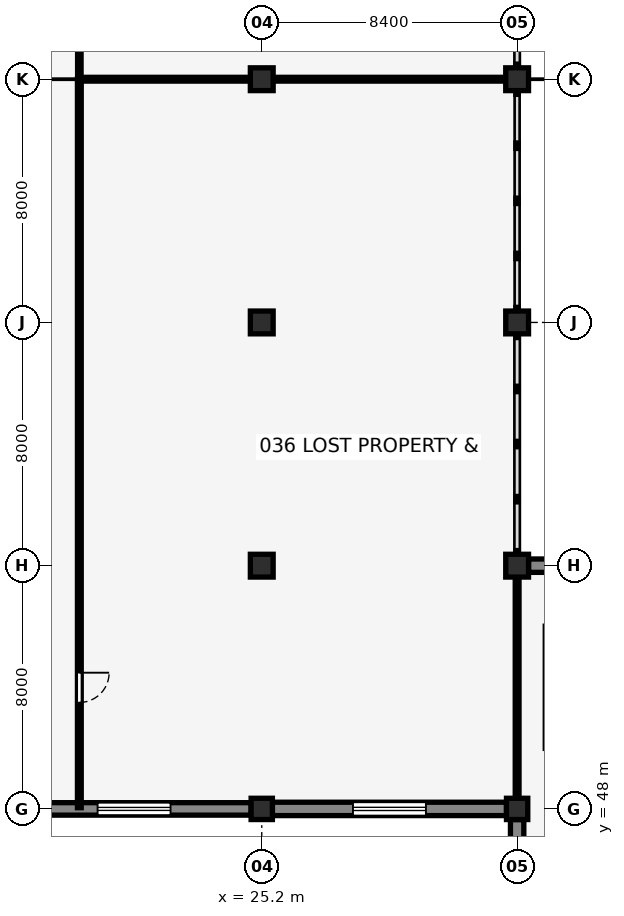
"""IFC4 building model, lengths in metres.
Left out: names, types, materials, properties, quantities, classifications, styles, units other than length and angle.
Written with IfcOpenShell. Run it as: python <this file> out.ifc"""

import sys

from ifc_helpers import new_model, si_unit, direction, frame, frame_2d, origin, origin_2d, place, context, subcontext, project, spatial, rectangle, extrude, element, fill, save


model = new_model("IFC4")
c1 = context("Model", 3, precision=1e-05, world=origin(), true_north=direction((0.0, 1.0)))
c2 = subcontext(c1, "Body", "Model", "MODEL_VIEW")
j1 = project(units=[si_unit("LENGTHUNIT", "METRE"), si_unit("PLANEANGLEUNIT", "RADIAN")], contexts=[c1])
p1 = place(None, origin())
s1 = spatial("IfcSite", under=j1, at=p1, CompositionType="ELEMENT")
p2 = place(p1, origin())
s2 = spatial("IfcBuilding", under=s1, at=p2, CompositionType="ELEMENT")
p3 = place(p2, origin())
s3 = spatial("IfcBuildingStorey", under=s2, at=p3, CompositionType="ELEMENT", Elevation=0.0)
p4 = place(p3, frame((25.2, 48.0, 0.0), z_axis=(0.0, 0.0, 1.0), x_axis=(1.0, 0.0, 0.0)))
e1 = element("IfcColumn", 1, at=p4, inside=s3, PredefinedType="COLUMN", context=c2, shape_type="SweptSolid", body=[
    extrude(rectangle(XDim=0.7, YDim=0.7, at=origin_2d()), origin(), (0.0, 0.0, 1.0), 5.15),
])
for number, where, z_axis, x_axis in (
    (2, (25.2, 56.0, 0.0), (0.0, 0.0, 1.0), (1.0, 0.0, 0.0)),
    (3, (25.2, 64.0, 0.0), (0.0, 0.0, 1.0), (1.0, 0.0, 0.0)),
    (4, (25.2, 72.0, 0.0), (0.0, 0.0, 1.0), (1.0, 0.0, 0.0)),
):
    element("IfcColumn", number, at=place(p3, frame(where, z_axis=z_axis, x_axis=x_axis)), inside=s3, PredefinedType="COLUMN", context=c2, shape_type="SweptSolid", body=[
        extrude(rectangle(XDim=0.75, YDim=0.75, at=origin_2d()), origin(), (0.0, 0.0, 1.0), 5.15),
    ])
p5 = place(p3, frame((33.6, 48.0, 0.0), z_axis=(0.0, 0.0, 1.0), x_axis=(1.0, 0.0, 0.0)))
e5 = element("IfcColumn", 5, at=p5, inside=s3, PredefinedType="COLUMN", context=c2, shape_type="SweptSolid", body=[
    extrude(rectangle(XDim=0.7, YDim=0.7, at=origin_2d()), origin(), (0.0, 0.0, 1.0), 5.15),
])
for number, where, z_axis, x_axis in (
    (6, (33.6, 56.0, 0.0), (0.0, 0.0, 1.0), (1.0, 0.0, 0.0)),
    (7, (33.6, 64.0, 0.0), (0.0, 0.0, 1.0), (1.0, 0.0, 0.0)),
    (8, (33.6, 72.0, 0.0), (0.0, 0.0, 1.0), (1.0, 0.0, 0.0)),
):
    element("IfcColumn", number, at=place(p3, frame(where, z_axis=z_axis, x_axis=x_axis)), inside=s3, PredefinedType="COLUMN", context=c2, shape_type="SweptSolid", body=[
        extrude(rectangle(XDim=0.75, YDim=0.75, at=origin_2d()), origin(), (0.0, 0.0, 1.0), 5.15),
    ])
p6 = place(p3, frame((33.6, 40.325, 0.0), z_axis=(0.0, 0.0, 1.0), x_axis=(0.0, 1.0, 0.0)))
e9 = element("IfcWall", 9, at=p6, inside=s3, PredefinedType="SOLIDWALL", context=c2, shape_type="SweptSolid", body=[
    extrude(rectangle(XDim=7.325, YDim=0.44, at=frame_2d((3.663, 0.0))), origin(), (0.0, 0.0, 1.0), 4.747),
])
p7 = place(p6, frame((2.163, 0.0, 0.9), z_axis=(0.0, 0.0, 1.0), x_axis=(1.0, 0.0, 0.0)))
e10 = element("IfcOpeningElement", 10, at=p7, cuts=e9, PredefinedType="OPENING", context=c2, shape_type="SweptSolid", body=[
    extrude(rectangle(XDim=3.0, YDim=1.65, at=frame_2d((1.5, 0.825))), frame((0.0, 0.23, 0.0), z_axis=(0.0, -1.0, 0.0), x_axis=(1.0, 0.0, 0.0)), (0.0, 0.0, 1.0), 0.46),
])
p8 = place(p3, frame((17.15, 48.0, 0.0), z_axis=(0.0, 0.0, 1.0), x_axis=(1.0, 0.0, 0.0)))
e11 = element("IfcWall", 11, at=p8, inside=s3, PredefinedType="SOLIDWALL", context=c2, shape_type="SweptSolid", body=[
    extrude(rectangle(XDim=7.7, YDim=0.41, at=frame_2d((3.85, 0.0))), origin(), (0.0, 0.0, 1.0), 4.74),
])
p9 = place(p8, frame((2.65, 0.0, 0.9), z_axis=(0.0, 0.0, 1.0), x_axis=(1.0, 0.0, 0.0)))
e12 = element("IfcOpeningElement", 12, at=p9, cuts=e11, PredefinedType="OPENING", context=c2, shape_type="SweptSolid", body=[
    extrude(rectangle(XDim=2.4, YDim=1.75, at=frame_2d((1.2, 0.875))), frame((0.0, 0.215, 0.0), z_axis=(0.0, -1.0, 0.0), x_axis=(1.0, 0.0, 0.0)), (0.0, 0.0, 1.0), 0.43),
])
p10 = place(p3, frame((25.55, 48.0, 0.0), z_axis=(0.0, 0.0, 1.0), x_axis=(1.0, 0.0, 0.0)))
e13 = element("IfcWall", 13, at=p10, inside=s3, PredefinedType="SOLIDWALL", context=c2, shape_type="SweptSolid", body=[
    extrude(rectangle(XDim=7.7, YDim=0.44, at=frame_2d((3.85, 0.0))), origin(), (0.0, 0.0, 1.0), 4.74),
])
p11 = place(p10, frame((2.65, 0.0, 0.9), z_axis=(0.0, 0.0, 1.0), x_axis=(1.0, 0.0, 0.0)))
e14 = element("IfcOpeningElement", 14, at=p11, cuts=e13, PredefinedType="OPENING", context=c2, shape_type="SweptSolid", body=[
    extrude(rectangle(XDim=2.4, YDim=1.5, at=frame_2d((1.2, 0.75))), frame((0.0, 0.23, 0.0), z_axis=(0.0, -1.0, 0.0), x_axis=(1.0, 0.0, 0.0)), (0.0, 0.0, 1.0), 0.46),
])
p12 = place(p3, frame((33.975, 56.0, 0.0), z_axis=(0.0, 0.0, 1.0), x_axis=(1.0, 0.0, 0.0)))
e15 = element("IfcWall", 15, at=p12, inside=s3, PredefinedType="SOLIDWALL", context=c2, shape_type="SweptSolid", body=[
    extrude(rectangle(XDim=7.7, YDim=0.44, at=frame_2d((3.85, 0.0))), origin(), (0.0, 0.0, 1.0), 4.74),
])
p13 = place(p3, frame((19.2, 48.04, 0.0), z_axis=(0.0, 0.0, 1.0), x_axis=(0.0, 1.0, 0.0)))
e16 = element("IfcWall", 16, at=p13, inside=s3, PredefinedType="PARTITIONING", context=c2, shape_type="SweptSolid", body=[
    extrude(rectangle(XDim=23.96, YDim=0.125, at=frame_2d((11.98, 0.0))), origin(), (0.0, 0.0, 1.0), 5.15),
])
p14 = place(p13, frame((4.44, 0.0, 0.0), z_axis=(0.0, 0.0, 1.0), x_axis=(-1.0, 0.0, 0.0)))
e17 = element("IfcOpeningElement", 17, at=p14, cuts=e16, PredefinedType="OPENING", context=c2, shape_type="SweptSolid", body=[
    extrude(rectangle(XDim=0.98, YDim=2.15, at=frame_2d((0.49, 1.075))), frame((0.0, 0.073, 0.0), z_axis=(0.0, -1.0, 0.0), x_axis=(1.0, 0.0, 0.0)), (0.0, 0.0, 1.0), 0.145),
])
p15 = place(p3, frame((19.2, 72.0, 0.0), z_axis=(0.0, 0.0, 1.0), x_axis=(0.0, 1.0, 0.0)))
e18 = element("IfcWall", 18, at=p15, inside=s3, PredefinedType="PARTITIONING", context=c2, shape_type="SweptSolid", body=[
    extrude(rectangle(XDim=16.0, YDim=0.115, at=frame_2d((8.0, 0.0))), origin(), (0.0, 0.0, 1.0), 5.15),
])
p16 = place(p15, frame((4.45, 0.0, 0.0), z_axis=(0.0, 0.0, 1.0), x_axis=(-1.0, 0.0, 0.0)))
e19 = element("IfcOpeningElement", 19, at=p16, cuts=e18, PredefinedType="OPENING", context=c2, shape_type="SweptSolid", body=[
    extrude(rectangle(XDim=0.95, YDim=2.15, at=frame_2d((0.475, 1.075))), frame((0.0, 0.067, 0.0), z_axis=(0.0, -1.0, 0.0), x_axis=(1.0, 0.0, 0.0)), (0.0, 0.0, 1.0), 0.135),
])
p17 = place(p3, frame((33.6, 48.34, 0.0), z_axis=(0.0, 0.0, 1.0), x_axis=(0.0, 1.0, 0.0)))
e20 = element("IfcWall", 20, at=p17, inside=s3, PredefinedType="PARTITIONING", context=c2, shape_type="SweptSolid", body=[
    extrude(rectangle(XDim=7.295, YDim=0.125, at=frame_2d((3.647, 0.0))), origin(), (0.0, 0.0, 1.0), 4.542),
])
p18 = place(p3, frame((19.2, 72.0, 0.0), z_axis=(0.0, 0.0, 1.0), x_axis=(1.0, 0.0, 0.0)))
e21 = element("IfcWall", 21, at=p18, inside=s3, PredefinedType="PARTITIONING", context=c2, shape_type="SweptSolid", body=[
    extrude(rectangle(XDim=5.635, YDim=0.125, at=frame_2d((2.817, 0.0))), origin(), (0.0, 0.0, 1.0), 4.605),
])
p19 = place(p3, frame((25.565, 72.0, 0.0), z_axis=(0.0, 0.0, 1.0), x_axis=(1.0, 0.0, 0.0)))
e22 = element("IfcWall", 22, at=p19, inside=s3, PredefinedType="PARTITIONING", context=c2, shape_type="SweptSolid", body=[
    extrude(rectangle(XDim=7.67, YDim=0.125, at=frame_2d((3.835, 0.0))), origin(), (0.0, 0.0, 1.0), 4.605),
])
p20 = place(p9, origin())
e23 = element("IfcWindow", 23, at=p20, inside=s3, PartitioningType="DOUBLE_PANEL_VERTICAL", PredefinedType="WINDOW", context=c2, shape_type="SweptSolid", body=[
    extrude(rectangle(XDim=2.4, YDim=1.75, at=frame_2d((1.2, 0.875))), frame((0.0, 0.03, 0.0), z_axis=(0.0, -1.0, 0.0), x_axis=(1.0, 0.0, 0.0)), (0.0, 0.0, 1.0), 0.06),
])
fill(e12, e23)
p21 = place(p11, origin())
e24 = element("IfcWindow", 24, at=p21, inside=s3, PartitioningType="DOUBLE_PANEL_VERTICAL", PredefinedType="WINDOW", context=c2, shape_type="SweptSolid", body=[
    extrude(rectangle(XDim=2.4, YDim=1.5, at=frame_2d((1.2, 0.75))), frame((0.0, 0.03, 0.0), z_axis=(0.0, -1.0, 0.0), x_axis=(1.0, 0.0, 0.0)), (0.0, 0.0, 1.0), 0.06),
])
fill(e14, e24)
p22 = place(p14, origin())
e25 = element("IfcDoor", 25, at=p22, inside=s3, OperationType="SINGLE_SWING_LEFT", PredefinedType="DOOR", context=c2, shape_type="SweptSolid", body=[
    extrude(rectangle(XDim=0.98, YDim=2.15, at=frame_2d((0.49, 1.075))), frame((0.0, 0.025, 0.0), z_axis=(0.0, -1.0, 0.0), x_axis=(1.0, 0.0, 0.0)), (0.0, 0.0, 1.0), 0.05),
])
fill(e17, e25)
save(model, sys.argv[1])
